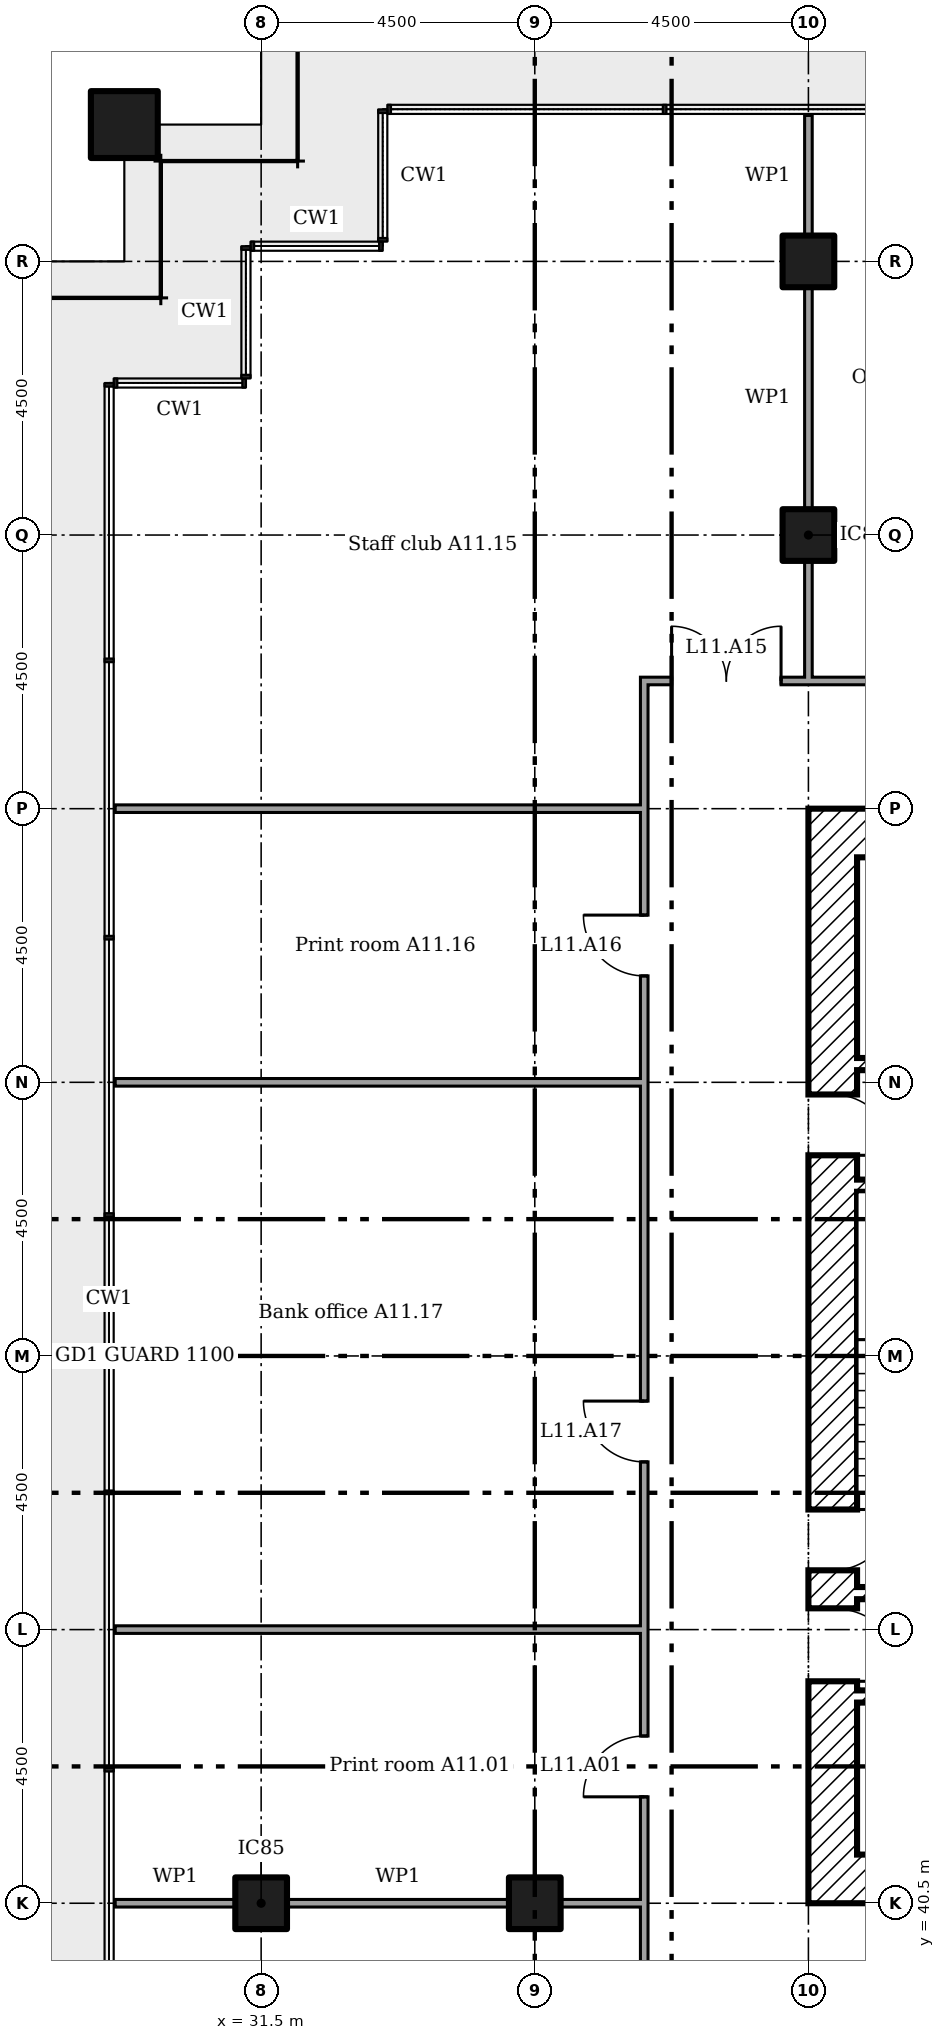
"""IFC4 building model, lengths in metres.
Left out: names, types, materials, properties, quantities, classifications, styles, units other than length and angle.
Written with IfcOpenShell. Run it as: python <this file> out.ifc"""

import sys

from ifc_helpers import new_model, si_unit, direction, frame, frame_2d, origin, origin_2d, place, context, subcontext, project, spatial, rectangle, extrude, element, fill, save


model = new_model("IFC4")
c1 = context("Model", 3, precision=1e-05, world=origin(), true_north=direction((0.0, 1.0)))
c2 = subcontext(c1, "Body", "Model", "MODEL_VIEW")
j1 = project(units=[si_unit("LENGTHUNIT", "METRE"), si_unit("PLANEANGLEUNIT", "RADIAN")], contexts=[c1])
p1 = place(None, origin())
s1 = spatial("IfcSite", under=j1, at=p1, CompositionType="ELEMENT")
p2 = place(p1, origin())
s2 = spatial("IfcBuilding", under=s1, at=p2, CompositionType="ELEMENT")
p3 = place(p2, frame((0.0, 0.0, 51.0)))
s3 = spatial("IfcBuildingStorey", under=s2, at=p3, CompositionType="ELEMENT", Elevation=51.0)
p4 = place(p3, frame((29.25, 69.75, 0.0)))
e1 = element("IfcColumn", 1, at=p4, inside=s3, PredefinedType="COLUMN", context=c2, shape_type="SweptSolid", body=[
    extrude(rectangle(XDim=1.1, YDim=1.1, at=origin_2d()), origin(), (0.0, 0.0, 1.0), 3.6),
])
for number, where in (
    (2, (31.5, 40.5, 0.0)),
    (3, (36.0, 40.5, 0.0)),
    (4, (40.5, 63.0, 0.0)),
    (5, (40.5, 67.5, 0.0)),
):
    element("IfcColumn", number, at=place(p3, frame(where)), inside=s3, PredefinedType="COLUMN", context=c2, shape_type="SweptSolid", body=[
        extrude(rectangle(XDim=0.85, YDim=0.85, at=origin_2d()), origin(), (0.0, 0.0, 1.0), 3.6),
    ])
for number, where in (
    (6, (41.3, 58.1, 0.0)),
    (7, (41.3, 40.9, 0.0)),
):
    element("IfcWall", number, at=place(p3, frame(where)), inside=s3, PredefinedType="SHEAR", context=c2, shape_type="SweptSolid", body=[
        extrude(rectangle(XDim=16.4, YDim=0.8, at=frame_2d((8.2, 0.0))), origin(), (0.0, 0.0, 1.0), 3.35),
    ])
p5 = place(p3, frame((40.9, 40.5, 0.0), z_axis=(0.0, 0.0, 1.0), x_axis=(0.0, 1.0, 0.0)))
e8 = element("IfcWall", 8, at=p5, inside=s3, PredefinedType="SHEAR", context=c2, shape_type="SweptSolid", body=[
    extrude(rectangle(XDim=18.0, YDim=0.8, at=frame_2d((9.0, 0.0))), origin(), (0.0, 0.0, 1.0), 3.35),
])
p6 = place(p5, frame((3.65, 0.0, 0.0)))
e9 = element("IfcOpeningElement", 9, at=p6, cuts=e8, PredefinedType="OPENING", context=c2, shape_type="SweptSolid", body=[
    extrude(rectangle(XDim=1.2, YDim=2.1, at=frame_2d((0.6, 1.05))), frame((0.0, 0.41, 0.0), z_axis=(0.0, -1.0, 0.0), x_axis=(1.0, 0.0, 0.0)), (0.0, 0.0, 1.0), 0.82),
])
p7 = place(p5, frame((5.475, 0.0, 0.0)))
e10 = element("IfcOpeningElement", 10, at=p7, cuts=e8, PredefinedType="OPENING", context=c2, shape_type="SweptSolid", body=[
    extrude(rectangle(XDim=1.0, YDim=2.1, at=frame_2d((0.5, 1.05))), frame((0.0, 0.41, 0.0), z_axis=(0.0, -1.0, 0.0), x_axis=(1.0, 0.0, 0.0)), (0.0, 0.0, 1.0), 0.82),
])
p8 = place(p5, frame((12.3, 0.0, 0.0)))
e11 = element("IfcOpeningElement", 11, at=p8, cuts=e8, PredefinedType="OPENING", context=c2, shape_type="SweptSolid", body=[
    extrude(rectangle(XDim=1.0, YDim=2.1, at=frame_2d((0.5, 1.05))), frame((0.0, 0.41, 0.0), z_axis=(0.0, -1.0, 0.0), x_axis=(1.0, 0.0, 0.0)), (0.0, 0.0, 1.0), 0.82),
])
p9 = place(p3, frame((41.3, 54.3, 0.0)))
e12 = element("IfcWall", 12, at=p9, inside=s3, PredefinedType="SHEAR", context=c2, shape_type="SweptSolid", body=[
    extrude(rectangle(XDim=5.433, YDim=0.2, at=frame_2d((2.717, 0.0))), origin(), (0.0, 0.0, 1.0), 3.35),
])
p10 = place(p9, frame((0.983, 0.0, 0.0)))
e13 = element("IfcOpeningElement", 13, at=p10, cuts=e12, PredefinedType="OPENING", context=c2, shape_type="SweptSolid", body=[
    extrude(rectangle(XDim=1.1, YDim=2.1, at=frame_2d((0.55, 1.05))), frame((0.0, 0.11, 0.0), z_axis=(0.0, -1.0, 0.0), x_axis=(1.0, 0.0, 0.0)), (0.0, 0.0, 1.0), 0.22),
])
p11 = place(p9, frame((3.65, 0.0, 0.0)))
e14 = element("IfcOpeningElement", 14, at=p11, cuts=e12, PredefinedType="OPENING", context=c2, shape_type="SweptSolid", body=[
    extrude(rectangle(XDim=1.1, YDim=2.1, at=frame_2d((0.55, 1.05))), frame((0.0, 0.11, 0.0), z_axis=(0.0, -1.0, 0.0), x_axis=(1.0, 0.0, 0.0)), (0.0, 0.0, 1.0), 0.22),
])
p12 = place(p3, frame((41.3, 43.9, 0.0)))
e15 = element("IfcWall", 15, at=p12, inside=s3, PredefinedType="SHEAR", context=c2, shape_type="SweptSolid", body=[
    extrude(rectangle(XDim=16.4, YDim=0.2, at=frame_2d((8.2, 0.0))), origin(), (0.0, 0.0, 1.0), 3.35),
])
p13 = place(p12, frame((0.933, 0.0, 0.0)))
e16 = element("IfcOpeningElement", 16, at=p13, cuts=e15, PredefinedType="OPENING", context=c2, shape_type="SweptSolid", body=[
    extrude(rectangle(XDim=1.2, YDim=2.1, at=frame_2d((0.6, 1.05))), frame((0.0, 0.11, 0.0), z_axis=(0.0, -1.0, 0.0), x_axis=(1.0, 0.0, 0.0)), (0.0, 0.0, 1.0), 0.22),
])
p14 = place(p12, frame((3.6, 0.0, 0.0)))
e17 = element("IfcOpeningElement", 17, at=p14, cuts=e15, PredefinedType="OPENING", context=c2, shape_type="SweptSolid", body=[
    extrude(rectangle(XDim=1.2, YDim=2.1, at=frame_2d((0.6, 1.05))), frame((0.0, 0.11, 0.0), z_axis=(0.0, -1.0, 0.0), x_axis=(1.0, 0.0, 0.0)), (0.0, 0.0, 1.0), 0.22),
])
p15 = place(p12, frame((6.267, 0.0, 0.0)))
e18 = element("IfcOpeningElement", 18, at=p15, cuts=e15, PredefinedType="OPENING", context=c2, shape_type="SweptSolid", body=[
    extrude(rectangle(XDim=1.2, YDim=2.1, at=frame_2d((0.6, 1.05))), frame((0.0, 0.11, 0.0), z_axis=(0.0, -1.0, 0.0), x_axis=(1.0, 0.0, 0.0)), (0.0, 0.0, 1.0), 0.22),
])
p16 = place(p12, frame((8.933, 0.0, 0.0)))
e19 = element("IfcOpeningElement", 19, at=p16, cuts=e15, PredefinedType="OPENING", context=c2, shape_type="SweptSolid", body=[
    extrude(rectangle(XDim=1.2, YDim=2.1, at=frame_2d((0.6, 1.05))), frame((0.0, 0.11, 0.0), z_axis=(0.0, -1.0, 0.0), x_axis=(1.0, 0.0, 0.0)), (0.0, 0.0, 1.0), 0.22),
])
p17 = place(p3, frame((41.3, 52.3, 0.0)))
e20 = element("IfcWall", 20, at=p17, inside=s3, PredefinedType="SHEAR", context=c2, shape_type="SweptSolid", body=[
    extrude(rectangle(XDim=2.7, YDim=0.2, at=frame_2d((1.35, 0.0))), origin(), (0.0, 0.0, 1.0), 3.35),
])
p18 = place(p3, frame((41.3, 45.6, 0.0)))
e21 = element("IfcWall", 21, at=p18, inside=s3, PredefinedType="SHEAR", context=c2, shape_type="SweptSolid", body=[
    extrude(rectangle(XDim=2.7, YDim=0.2, at=frame_2d((1.35, 0.0))), origin(), (0.0, 0.0, 1.0), 3.35),
])
p19 = place(p18, frame((0.95, 0.0, 0.0)))
e22 = element("IfcOpeningElement", 22, at=p19, cuts=e21, PredefinedType="OPENING", context=c2, shape_type="SweptSolid", body=[
    extrude(rectangle(XDim=1.0, YDim=2.1, at=frame_2d((0.5, 1.05))), frame((0.0, 0.11, 0.0), z_axis=(0.0, -1.0, 0.0), x_axis=(1.0, 0.0, 0.0)), (0.0, 0.0, 1.0), 0.22),
])
p20 = place(p3, frame((29.1, 40.5, 0.0)))
e23 = element("IfcWall", 23, at=p20, inside=s3, PredefinedType="PARTITIONING", context=c2, shape_type="SweptSolid", body=[
    extrude(rectangle(XDim=1.975, YDim=0.125, at=frame_2d((0.987, 0.0))), origin(), (0.0, 0.0, 1.0), 2.676),
])
p21 = place(p3, frame((31.925, 40.5, 0.0)))
e24 = element("IfcWall", 24, at=p21, inside=s3, PredefinedType="PARTITIONING", context=c2, shape_type="SweptSolid", body=[
    extrude(rectangle(XDim=3.65, YDim=0.125, at=frame_2d((1.825, 0.0))), origin(), (0.0, 0.0, 1.0), 2.676),
])
p22 = place(p3, frame((36.425, 40.5, 0.0)))
e25 = element("IfcWall", 25, at=p22, inside=s3, PredefinedType="PARTITIONING", context=c2, shape_type="SweptSolid", body=[
    extrude(rectangle(XDim=1.375, YDim=0.125, at=frame_2d((0.688, 0.0))), origin(), (0.0, 0.0, 1.0), 2.676),
])
for number, where in (
    (26, (29.1, 45.0, 0.0)),
    (27, (29.1, 54.0, 0.0)),
    (28, (29.1, 58.5, 0.0)),
):
    element("IfcWall", number, at=place(p3, frame(where)), inside=s3, PredefinedType="PARTITIONING", context=c2, shape_type="SweptSolid", body=[
        extrude(rectangle(XDim=8.7, YDim=0.125, at=frame_2d((4.35, 0.0))), origin(), (0.0, 0.0, 1.0), 2.766),
    ])
p23 = place(p3, frame((37.738, 60.6, 0.0)))
e29 = element("IfcWall", 29, at=p23, inside=s3, PredefinedType="PARTITIONING", context=c2, shape_type="SweptSolid", body=[
    extrude(rectangle(XDim=23.525, YDim=0.125, at=frame_2d((11.762, 0.0))), origin(), (0.0, 0.0, 1.0), 3.45),
])
p24 = place(p23, frame((21.212, 0.0, 0.0)))
e30 = element("IfcOpeningElement", 30, at=p24, cuts=e29, PredefinedType="OPENING", context=c2, shape_type="SweptSolid", body=[
    extrude(rectangle(XDim=1.8, YDim=2.1, at=frame_2d((0.9, 1.05))), frame((0.0, 0.073, 0.0), z_axis=(0.0, -1.0, 0.0), x_axis=(1.0, 0.0, 0.0)), (0.0, 0.0, 1.0), 0.145),
])
p25 = place(p23, frame((17.558, 0.0, 0.0)))
e31 = element("IfcOpeningElement", 31, at=p25, cuts=e29, PredefinedType="OPENING", context=c2, shape_type="SweptSolid", body=[
    extrude(rectangle(XDim=1.0, YDim=2.1, at=frame_2d((0.5, 1.05))), frame((0.0, 0.073, 0.0), z_axis=(0.0, -1.0, 0.0), x_axis=(1.0, 0.0, 0.0)), (0.0, 0.0, 1.0), 0.145),
])
p26 = place(p23, frame((13.968, 0.0, 0.0)))
e32 = element("IfcOpeningElement", 32, at=p26, cuts=e29, PredefinedType="OPENING", context=c2, shape_type="SweptSolid", body=[
    extrude(rectangle(XDim=1.0, YDim=2.1, at=frame_2d((0.5, 1.05))), frame((0.0, 0.073, 0.0), z_axis=(0.0, -1.0, 0.0), x_axis=(1.0, 0.0, 0.0)), (0.0, 0.0, 1.0), 0.145),
])
p27 = place(p23, frame((9.012, 0.0, 0.0)))
e33 = element("IfcOpeningElement", 33, at=p27, cuts=e29, PredefinedType="OPENING", context=c2, shape_type="SweptSolid", body=[
    extrude(rectangle(XDim=1.0, YDim=2.1, at=frame_2d((0.5, 1.05))), frame((0.0, 0.073, 0.0), z_axis=(0.0, -1.0, 0.0), x_axis=(1.0, 0.0, 0.0)), (0.0, 0.0, 1.0), 0.145),
])
p28 = place(p23, frame((4.058, 0.0, 0.0)))
e34 = element("IfcOpeningElement", 34, at=p28, cuts=e29, PredefinedType="OPENING", context=c2, shape_type="SweptSolid", body=[
    extrude(rectangle(XDim=1.0, YDim=2.1, at=frame_2d((0.5, 1.05))), frame((0.0, 0.073, 0.0), z_axis=(0.0, -1.0, 0.0), x_axis=(1.0, 0.0, 0.0)), (0.0, 0.0, 1.0), 0.145),
])
p29 = place(p23, frame((0.512, 0.0, 0.0)))
e35 = element("IfcOpeningElement", 35, at=p29, cuts=e29, PredefinedType="OPENING", context=c2, shape_type="SweptSolid", body=[
    extrude(rectangle(XDim=1.8, YDim=2.1, at=frame_2d((0.9, 1.05))), frame((0.0, 0.073, 0.0), z_axis=(0.0, -1.0, 0.0), x_axis=(1.0, 0.0, 0.0)), (0.0, 0.0, 1.0), 0.145),
])
p30 = place(p3, frame((37.8, 38.462, 0.0), z_axis=(0.0, 0.0, 1.0), x_axis=(0.0, 1.0, 0.0)))
e36 = element("IfcWall", 36, at=p30, inside=s3, PredefinedType="PARTITIONING", context=c2, shape_type="SweptSolid", body=[
    extrude(rectangle(XDim=22.075, YDim=0.125, at=frame_2d((11.038, 0.0))), origin(), (0.0, 0.0, 1.0), 3.45),
])
p31 = place(p30, frame((3.788, 0.0, 0.0)))
e37 = element("IfcOpeningElement", 37, at=p31, cuts=e36, PredefinedType="OPENING", context=c2, shape_type="SweptSolid", body=[
    extrude(rectangle(XDim=1.0, YDim=2.1, at=frame_2d((0.5, 1.05))), frame((0.0, 0.073, 0.0), z_axis=(0.0, -1.0, 0.0), x_axis=(1.0, 0.0, 0.0)), (0.0, 0.0, 1.0), 0.145),
])
p32 = place(p30, frame((17.288, 0.0, 0.0)))
e38 = element("IfcOpeningElement", 38, at=p32, cuts=e36, PredefinedType="OPENING", context=c2, shape_type="SweptSolid", body=[
    extrude(rectangle(XDim=1.0, YDim=2.1, at=frame_2d((0.5, 1.05))), frame((0.0, 0.073, 0.0), z_axis=(0.0, -1.0, 0.0), x_axis=(1.0, 0.0, 0.0)), (0.0, 0.0, 1.0), 0.145),
])
p33 = place(p30, frame((9.295, 0.0, 0.0)))
e39 = element("IfcOpeningElement", 39, at=p33, cuts=e36, PredefinedType="OPENING", context=c2, shape_type="SweptSolid", body=[
    extrude(rectangle(XDim=1.0, YDim=2.1, at=frame_2d((0.5, 1.05))), frame((0.0, 0.073, 0.0), z_axis=(0.0, -1.0, 0.0), x_axis=(1.0, 0.0, 0.0)), (0.0, 0.0, 1.0), 0.145),
])
p34 = place(p3, frame((40.5, 60.6, 0.0), z_axis=(0.0, 0.0, 1.0), x_axis=(0.0, 1.0, 0.0)))
e40 = element("IfcWall", 40, at=p34, inside=s3, PredefinedType="PARTITIONING", context=c2, shape_type="SweptSolid", body=[
    extrude(rectangle(XDim=1.975, YDim=0.125, at=frame_2d((0.987, 0.0))), origin(), (0.0, 0.0, 1.0), 2.676),
])
p35 = place(p3, frame((40.5, 63.425, 0.0), z_axis=(0.0, 0.0, 1.0), x_axis=(0.0, 1.0, 0.0)))
e41 = element("IfcWall", 41, at=p35, inside=s3, PredefinedType="PARTITIONING", context=c2, shape_type="SweptSolid", body=[
    extrude(rectangle(XDim=3.65, YDim=0.125, at=frame_2d((1.825, 0.0))), origin(), (0.0, 0.0, 1.0), 2.676),
])
p36 = place(p3, frame((40.5, 67.925, 0.0), z_axis=(0.0, 0.0, 1.0), x_axis=(0.0, 1.0, 0.0)))
e42 = element("IfcWall", 42, at=p36, inside=s3, PredefinedType="PARTITIONING", context=c2, shape_type="SweptSolid", body=[
    extrude(rectangle(XDim=1.975, YDim=0.125, at=frame_2d((0.987, 0.0))), origin(), (0.0, 0.0, 1.0), 2.676),
])
p37 = place(p6, frame((1.2, 0.0, 0.0), x_axis=(-1.0, 0.0, 0.0)))
e43 = element("IfcDoor", 43, at=p37, inside=s3, OperationType="SINGLE_SWING_LEFT", PredefinedType="DOOR", context=c2, shape_type="SweptSolid", body=[
    extrude(rectangle(XDim=1.2, YDim=2.1, at=frame_2d((0.6, 1.05))), frame((0.0, 0.025, 0.0), z_axis=(0.0, -1.0, 0.0), x_axis=(1.0, 0.0, 0.0)), (0.0, 0.0, 1.0), 0.05),
])
fill(e9, e43)
p38 = place(p7, frame((1.0, 0.0, 0.0), x_axis=(-1.0, 0.0, 0.0)))
e44 = element("IfcDoor", 44, at=p38, inside=s3, OperationType="SINGLE_SWING_RIGHT", PredefinedType="DOOR", context=c2, shape_type="SweptSolid", body=[
    extrude(rectangle(XDim=1.0, YDim=2.1, at=frame_2d((0.5, 1.05))), frame((0.0, 0.025, 0.0), z_axis=(0.0, -1.0, 0.0), x_axis=(1.0, 0.0, 0.0)), (0.0, 0.0, 1.0), 0.05),
])
fill(e10, e44)
p39 = place(p8, frame((1.0, 0.0, 0.0), x_axis=(-1.0, 0.0, 0.0)))
e45 = element("IfcDoor", 45, at=p39, inside=s3, OperationType="SINGLE_SWING_LEFT", PredefinedType="DOOR", context=c2, shape_type="SweptSolid", body=[
    extrude(rectangle(XDim=1.0, YDim=2.1, at=frame_2d((0.5, 1.05))), frame((0.0, 0.025, 0.0), z_axis=(0.0, -1.0, 0.0), x_axis=(1.0, 0.0, 0.0)), (0.0, 0.0, 1.0), 0.05),
])
fill(e11, e45)
p40 = place(p31, origin())
e46 = element("IfcDoor", 46, at=p40, inside=s3, OperationType="SINGLE_SWING_RIGHT", PredefinedType="DOOR", context=c2, shape_type="SweptSolid", body=[
    extrude(rectangle(XDim=1.0, YDim=2.1, at=frame_2d((0.5, 1.05))), frame((0.0, 0.025, 0.0), z_axis=(0.0, -1.0, 0.0), x_axis=(1.0, 0.0, 0.0)), (0.0, 0.0, 1.0), 0.05),
])
fill(e37, e46)
p41 = place(p29, origin())
e47 = element("IfcDoor", 47, at=p41, inside=s3, OperationType="DOUBLE_DOOR_SINGLE_SWING", PredefinedType="DOOR", context=c2, shape_type="SweptSolid", body=[
    extrude(rectangle(XDim=1.8, YDim=2.1, at=frame_2d((0.9, 1.05))), frame((0.0, 0.025, 0.0), z_axis=(0.0, -1.0, 0.0), x_axis=(1.0, 0.0, 0.0)), (0.0, 0.0, 1.0), 0.05),
])
fill(e35, e47)
p42 = place(p32, origin())
e48 = element("IfcDoor", 48, at=p42, inside=s3, OperationType="SINGLE_SWING_LEFT", PredefinedType="DOOR", context=c2, shape_type="SweptSolid", body=[
    extrude(rectangle(XDim=1.0, YDim=2.1, at=frame_2d((0.5, 1.05))), frame((0.0, 0.025, 0.0), z_axis=(0.0, -1.0, 0.0), x_axis=(1.0, 0.0, 0.0)), (0.0, 0.0, 1.0), 0.05),
])
fill(e38, e48)
p43 = place(p33, origin())
e49 = element("IfcDoor", 49, at=p43, inside=s3, OperationType="SINGLE_SWING_LEFT", PredefinedType="DOOR", context=c2, shape_type="SweptSolid", body=[
    extrude(rectangle(XDim=1.0, YDim=2.1, at=frame_2d((0.5, 1.05))), frame((0.0, 0.025, 0.0), z_axis=(0.0, -1.0, 0.0), x_axis=(1.0, 0.0, 0.0)), (0.0, 0.0, 1.0), 0.05),
])
fill(e39, e49)
save(model, sys.argv[1])
